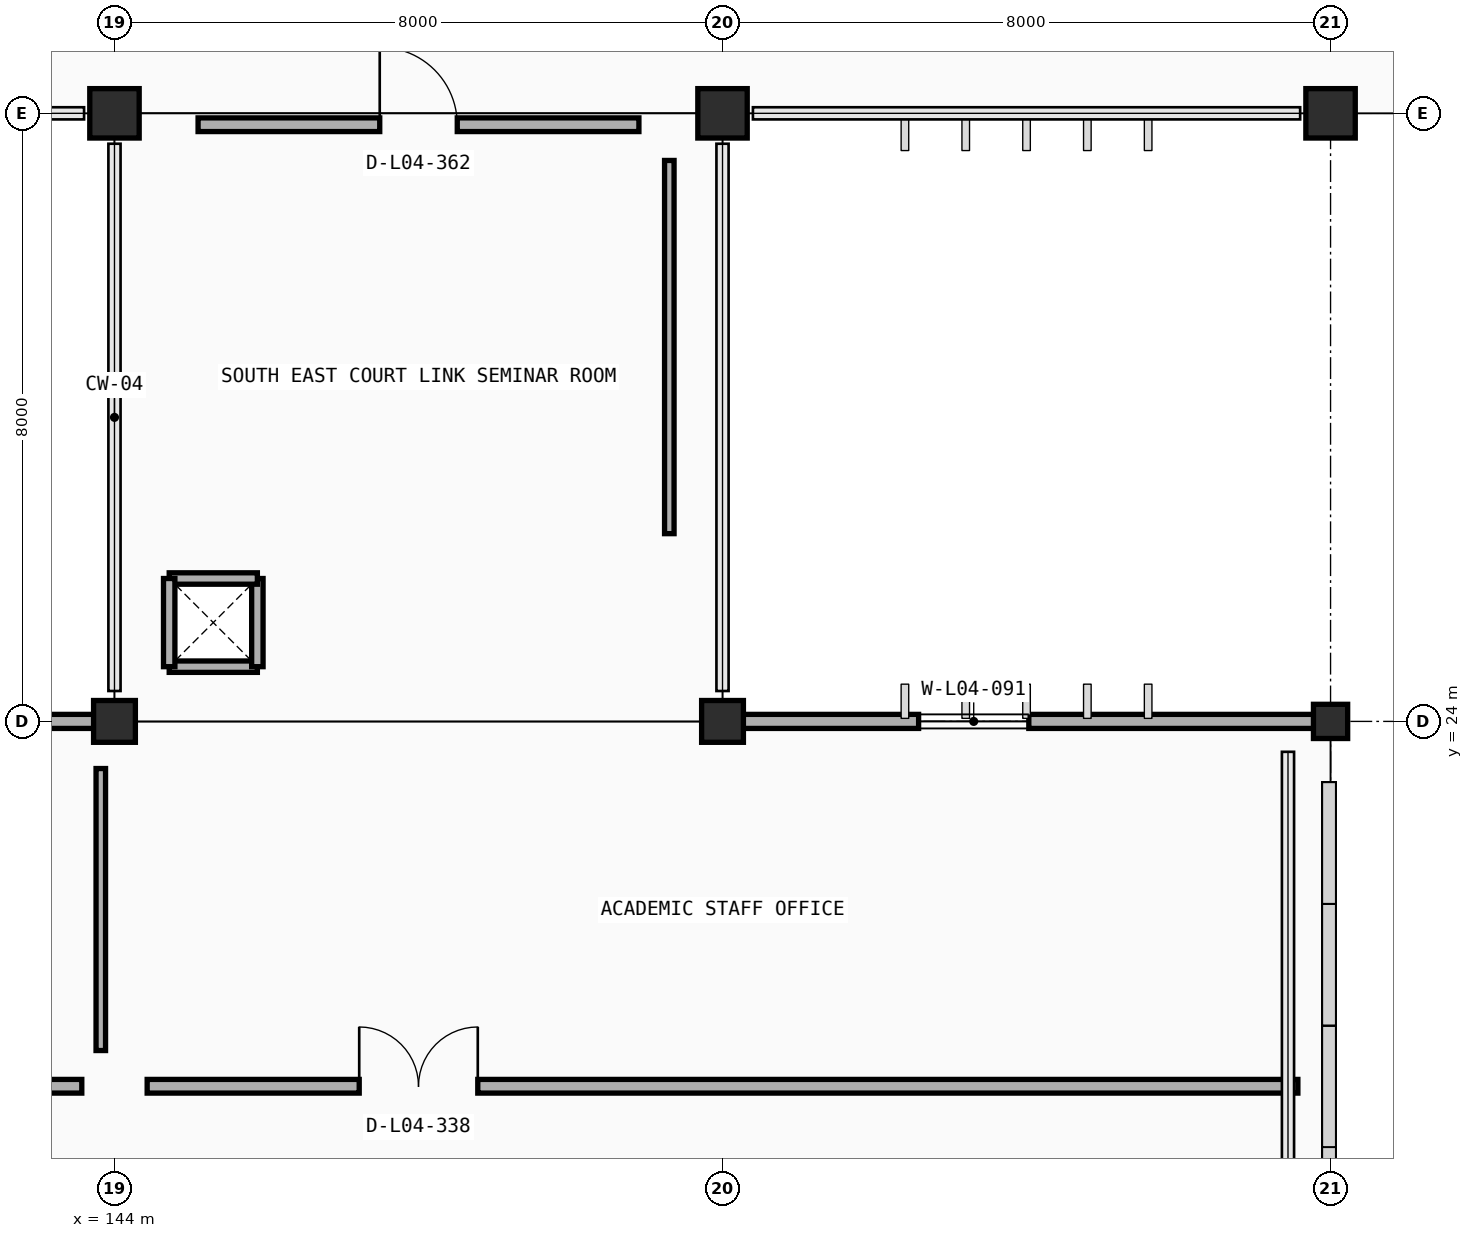
"""IFC4 building model, lengths in metres.
Left out: names, types, materials, properties, quantities, classifications, styles, units other than length and angle.
Written with IfcOpenShell. Run it as: python <this file> out.ifc"""

import sys

from ifc_helpers import new_model, si_unit, direction, frame, frame_2d, origin, origin_2d, place, context, subcontext, project, spatial, rectangle, extrude, element, fill, save


model = new_model("IFC4")
c1 = context("Model", 3, precision=1e-05, world=origin(), true_north=direction((0.0, 1.0)))
c2 = subcontext(c1, "Body", "Model", "MODEL_VIEW")
j1 = project(units=[si_unit("LENGTHUNIT", "METRE"), si_unit("PLANEANGLEUNIT", "RADIAN")], contexts=[c1])
p1 = place(None, origin())
s1 = spatial("IfcSite", under=j1, at=p1, CompositionType="ELEMENT")
p2 = place(p1, origin())
s2 = spatial("IfcBuilding", under=s1, at=p2, CompositionType="ELEMENT")
p3 = place(p2, frame((0.0, 0.0, 13.8)))
s3 = spatial("IfcBuildingStorey", under=s2, at=p3, CompositionType="ELEMENT", Elevation=13.8)
for number, where, z_axis, x_axis in (
    (1, (144.0, 24.0, 0.0), (0.0, 0.0, 1.0), (1.0, 0.0, 0.0)),
    (2, (152.0, 24.0, 0.0), (0.0, 0.0, 1.0), (1.0, 0.0, 0.0)),
):
    element("IfcColumn", number, at=place(p3, frame(where, z_axis=z_axis, x_axis=x_axis)), inside=s3, PredefinedType="COLUMN", context=c2, shape_type="SweptSolid", body=[
        extrude(rectangle(XDim=0.55, YDim=0.55, at=origin_2d()), origin(), (0.0, 0.0, 1.0), 4.2),
    ])
p4 = place(p3, frame((160.0, 24.0, 0.0), z_axis=(0.0, 0.0, 1.0), x_axis=(1.0, 0.0, 0.0)))
e3 = element("IfcColumn", 3, at=p4, inside=s3, PredefinedType="COLUMN", context=c2, shape_type="SweptSolid", body=[
    extrude(rectangle(XDim=0.45, YDim=0.45, at=origin_2d()), origin(), (0.0, 0.0, 1.0), 4.2),
])
for number, where, z_axis, x_axis in (
    (4, (144.0, 32.0, 0.0), (0.0, 0.0, 1.0), (1.0, 0.0, 0.0)),
    (5, (152.0, 32.0, 0.0), (0.0, 0.0, 1.0), (1.0, 0.0, 0.0)),
    (6, (160.0, 32.0, 0.0), (0.0, 0.0, 1.0), (1.0, 0.0, 0.0)),
):
    element("IfcColumn", number, at=place(p3, frame(where, z_axis=z_axis, x_axis=x_axis)), inside=s3, PredefinedType="COLUMN", context=c2, shape_type="SweptSolid", body=[
        extrude(rectangle(XDim=0.65, YDim=0.65, at=origin_2d()), origin(), (0.0, 0.0, 1.0), 4.2),
    ])
p5 = place(p3, frame((136.272, 24.0, 0.0), z_axis=(0.0, 0.0, 1.0), x_axis=(1.0, 0.0, 0.0)))
e7 = element("IfcWall", 7, at=p5, inside=s3, PredefinedType="STANDARD", context=c2, shape_type="SweptSolid", body=[
    extrude(rectangle(XDim=7.456, YDim=0.185, at=frame_2d((3.728, 0.0))), origin(), (0.0, 0.0, 1.0), 3.325),
])
p6 = place(p5, frame((2.308, 0.0, 0.9)))
e8 = element("IfcOpeningElement", 8, at=p6, cuts=e7, PredefinedType="OPENING", context=c2, shape_type="SweptSolid", body=[
    extrude(rectangle(XDim=1.85, YDim=1.4, at=frame_2d((0.925, 0.7))), frame((0.0, 0.103, 0.0), z_axis=(0.0, -1.0, 0.0), x_axis=(1.0, 0.0, 0.0)), (0.0, 0.0, 1.0), 0.205),
])
p7 = place(p3, frame((152.272, 24.0, 0.0), z_axis=(0.0, 0.0, 1.0), x_axis=(1.0, 0.0, 0.0)))
e9 = element("IfcWall", 9, at=p7, inside=s3, PredefinedType="STANDARD", context=c2, shape_type="SweptSolid", body=[
    extrude(rectangle(XDim=7.506, YDim=0.185, at=frame_2d((3.753, 0.0))), origin(), (0.0, 0.0, 1.0), 3.35),
])
p8 = place(p7, frame((2.308, 0.0, 0.9)))
e10 = element("IfcOpeningElement", 10, at=p8, cuts=e9, PredefinedType="OPENING", context=c2, shape_type="SweptSolid", body=[
    extrude(rectangle(XDim=1.45, YDim=1.4, at=frame_2d((0.725, 0.7))), frame((0.0, 0.103, 0.0), z_axis=(0.0, -1.0, 0.0), x_axis=(1.0, 0.0, 0.0)), (0.0, 0.0, 1.0), 0.205),
])
p9 = place(p3, frame((159.76, 23.78, 0.0), z_axis=(0.0, 0.0, 1.0), x_axis=(-1.0, 0.0, 0.0)))
e11 = element("IfcWall", 11, at=p9, inside=s3, PredefinedType="PARAPET", context=c2, shape_type="SweptSolid", body=[
    extrude(rectangle(XDim=0.32, YDim=0.2, at=frame_2d((0.16, 0.0))), origin(), (0.0, 0.0, 1.0), 3.35),
])
p10 = place(p3, frame((160.26, 15.92, -0.02), z_axis=(0.0, 0.0, 1.0), x_axis=(0.0, 1.0, 0.0)))
e12 = element("IfcWall", 12, at=p10, inside=s3, PredefinedType="PARAPET", context=c2, shape_type="SweptSolid", body=[
    extrude(rectangle(XDim=3.98, YDim=0.2, at=frame_2d((1.99, 0.0))), origin(), (0.0, 0.0, 1.0), 2.503),
])
p11 = place(p3, frame((160.26, 19.9, -0.02), z_axis=(0.0, 0.0, 1.0), x_axis=(0.0, 1.0, 0.0)))
e13 = element("IfcWall", 13, at=p11, inside=s3, PredefinedType="PARAPET", context=c2, shape_type="SweptSolid", body=[
    extrude(rectangle(XDim=3.98, YDim=0.2, at=frame_2d((1.99, 0.0))), origin(), (0.0, 0.0, 1.0), 3.004),
])
p12 = place(p3, frame((160.26, 23.88, -0.02), z_axis=(0.0, 0.0, 1.0), x_axis=(0.0, 1.0, 0.0)))
e14 = element("IfcWall", 14, at=p12, inside=s3, PredefinedType="PARAPET", context=c2, shape_type="SweptSolid", body=[
    extrude(rectangle(XDim=3.98, YDim=0.2, at=frame_2d((1.99, 0.0))), origin(), (0.0, 0.0, 1.0), 3.505),
])
p13 = place(p3, frame((160.26, 27.86, -0.02), z_axis=(0.0, 0.0, 1.0), x_axis=(0.0, 1.0, 0.0)))
e15 = element("IfcWall", 15, at=p13, inside=s3, PredefinedType="PARAPET", context=c2, shape_type="SweptSolid", body=[
    extrude(rectangle(XDim=3.98, YDim=0.2, at=frame_2d((1.99, 0.0))), origin(), (0.0, 0.0, 1.0), 4.005),
])
for number, where, z_axis, x_axis in (
    (16, (144.72, 24.72, 0.0), (0.0, 0.0, 1.0), (1.0, 0.0, 0.0)),
    (17, (145.88, 24.72, 0.0), (0.0, 0.0, 1.0), (0.0, 1.0, 0.0)),
    (18, (145.88, 25.88, 0.0), (0.0, 0.0, 1.0), (-1.0, 0.0, 0.0)),
    (19, (144.72, 25.88, 0.0), (0.0, 0.0, 1.0), (0.0, -1.0, 0.0)),
):
    element("IfcWall", number, at=place(p3, frame(where, z_axis=z_axis, x_axis=x_axis)), inside=s3, PredefinedType="PARTITIONING", context=c2, shape_type="SweptSolid", body=[
        extrude(rectangle(XDim=1.16, YDim=0.15, at=frame_2d((0.58, 0.0))), origin(), (0.0, 0.0, 1.0), 3.9),
    ])
p14 = place(p3, frame((120.43, 19.2, 0.0), z_axis=(0.0, 0.0, 1.0), x_axis=(1.0, 0.0, 0.0)))
e20 = element("IfcWall", 20, at=p14, inside=s3, PredefinedType="PARTITIONING", context=c2, shape_type="SweptSolid", body=[
    extrude(rectangle(XDim=23.14, YDim=0.18, at=frame_2d((11.57, 0.0))), origin(), (0.0, 0.0, 1.0), 3.3),
])
p15 = place(p14, frame((2.66, 0.0, 0.0)))
e21 = element("IfcOpeningElement", 21, at=p15, cuts=e20, PredefinedType="OPENING", context=c2, shape_type="SweptSolid", body=[
    extrude(rectangle(XDim=1.82, YDim=2.25, at=frame_2d((0.91, 1.125))), frame((0.0, 0.1, 0.0), z_axis=(0.0, -1.0, 0.0), x_axis=(1.0, 0.0, 0.0)), (0.0, 0.0, 1.0), 0.2),
])
p16 = place(p3, frame((143.82, 19.67, 0.0), z_axis=(0.0, 0.0, 1.0), x_axis=(0.0, 1.0, 0.0)))
e22 = element("IfcWall", 22, at=p16, inside=s3, PredefinedType="PARTITIONING", context=c2, shape_type="SweptSolid", body=[
    extrude(rectangle(XDim=3.71, YDim=0.125, at=frame_2d((1.855, 0.0))), origin(), (0.0, 0.0, 1.0), 3.225),
])
p17 = place(p3, frame((144.43, 19.2, 0.0), z_axis=(0.0, 0.0, 1.0), x_axis=(1.0, 0.0, 0.0)))
e23 = element("IfcWall", 23, at=p17, inside=s3, PredefinedType="PARTITIONING", context=c2, shape_type="SweptSolid", body=[
    extrude(rectangle(XDim=15.14, YDim=0.18, at=frame_2d((7.57, 0.0))), origin(), (0.0, 0.0, 1.0), 3.3),
])
p18 = place(p17, frame((2.79, 0.0, 0.0)))
e24 = element("IfcOpeningElement", 24, at=p18, cuts=e23, PredefinedType="OPENING", context=c2, shape_type="SweptSolid", body=[
    extrude(rectangle(XDim=1.56, YDim=2.2, at=frame_2d((0.78, 1.1))), frame((0.0, 0.1, 0.0), z_axis=(0.0, -1.0, 0.0), x_axis=(1.0, 0.0, 0.0)), (0.0, 0.0, 1.0), 0.2),
])
p19 = place(p3, frame((145.1, 31.85, 0.0), z_axis=(0.0, 0.0, 1.0), x_axis=(1.0, 0.0, 0.0)))
e25 = element("IfcWall", 25, at=p19, inside=s3, PredefinedType="PARTITIONING", context=c2, shape_type="SweptSolid", body=[
    extrude(rectangle(XDim=5.8, YDim=0.18, at=frame_2d((2.9, 0.0))), origin(), (0.0, 0.0, 1.0), 3.3),
])
p20 = place(p19, frame((2.39, 0.0, 0.0)))
e26 = element("IfcOpeningElement", 26, at=p20, cuts=e25, PredefinedType="OPENING", context=c2, shape_type="SweptSolid", body=[
    extrude(rectangle(XDim=1.02, YDim=2.1, at=frame_2d((0.51, 1.05))), frame((0.0, 0.1, 0.0), z_axis=(0.0, -1.0, 0.0), x_axis=(1.0, 0.0, 0.0)), (0.0, 0.0, 1.0), 0.2),
])
p21 = place(p3, frame((151.3, 26.47, 0.0), z_axis=(0.0, 0.0, 1.0), x_axis=(0.0, 1.0, 0.0)))
e27 = element("IfcWall", 27, at=p21, inside=s3, PredefinedType="PARTITIONING", context=c2, shape_type="SweptSolid", body=[
    extrude(rectangle(XDim=4.91, YDim=0.125, at=frame_2d((2.455, 0.0))), origin(), (0.0, 0.0, 1.0), 3.3),
])
p22 = place(p8, origin())
e28 = element("IfcWindow", 28, at=p22, inside=s3, PartitioningType="SINGLE_PANEL", PredefinedType="WINDOW", context=c2, shape_type="SweptSolid", body=[
    extrude(rectangle(XDim=1.45, YDim=1.4, at=frame_2d((0.725, 0.7))), frame((0.0, 0.03, 0.0), z_axis=(0.0, -1.0, 0.0), x_axis=(1.0, 0.0, 0.0)), (0.0, 0.0, 1.0), 0.06),
])
fill(e10, e28)
p23 = place(p18, origin())
e29 = element("IfcDoor", 29, at=p23, inside=s3, OperationType="DOUBLE_DOOR_SINGLE_SWING", PredefinedType="DOOR", context=c2, shape_type="SweptSolid", body=[
    extrude(rectangle(XDim=1.56, YDim=2.2, at=frame_2d((0.78, 1.1))), frame((0.0, 0.025, 0.0), z_axis=(0.0, -1.0, 0.0), x_axis=(1.0, 0.0, 0.0)), (0.0, 0.0, 1.0), 0.05),
])
fill(e24, e29)
p24 = place(p20, origin())
e30 = element("IfcDoor", 30, at=p24, inside=s3, OperationType="SINGLE_SWING_LEFT", PredefinedType="DOOR", context=c2, shape_type="SweptSolid", body=[
    extrude(rectangle(XDim=1.02, YDim=2.1, at=frame_2d((0.51, 1.05))), frame((0.0, 0.025, 0.0), z_axis=(0.0, -1.0, 0.0), x_axis=(1.0, 0.0, 0.0)), (0.0, 0.0, 1.0), 0.05),
])
fill(e26, e30)
save(model, sys.argv[1])
